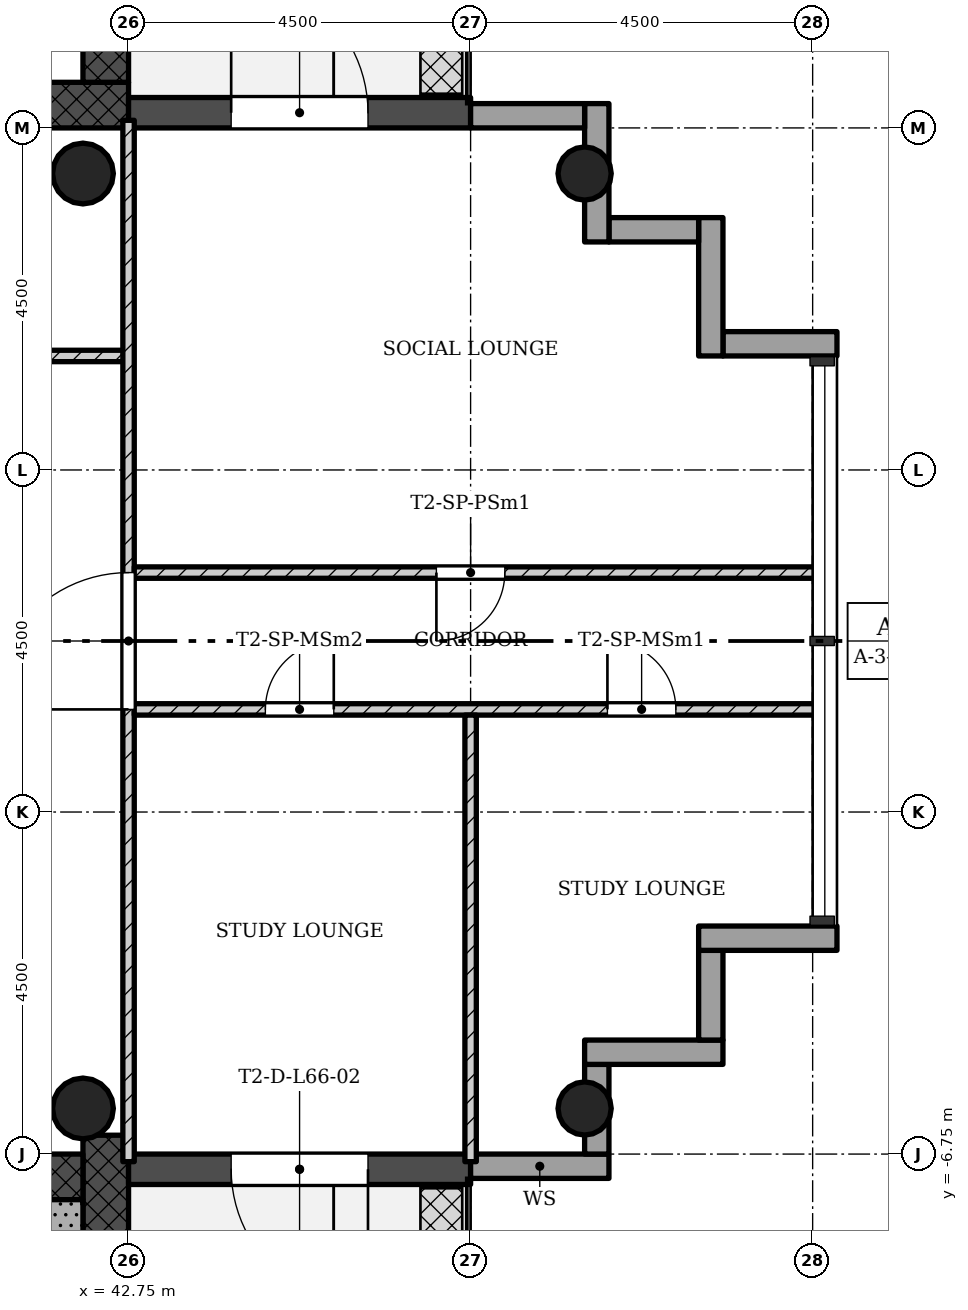
"""IFC4 building model, lengths in metres.
Left out: names, types, materials, properties, quantities, classifications, styles, units other than length and angle.
Written with IfcOpenShell. Run it as: python <this file> out.ifc"""

import sys

from ifc_helpers import new_model, si_unit, direction, frame, frame_2d, origin, origin_2d, place, context, subcontext, project, spatial, rectangle, hollow_circle, extrude, element, fill, save


model = new_model("IFC4")
c1 = context("Model", 3, precision=1e-05, world=origin(), true_north=direction((0.0, 1.0)))
c2 = subcontext(c1, "Body", "Model", "MODEL_VIEW")
j1 = project(units=[si_unit("LENGTHUNIT", "METRE"), si_unit("PLANEANGLEUNIT", "RADIAN")], contexts=[c1])
p1 = place(None, origin())
s1 = spatial("IfcSite", under=j1, at=p1, CompositionType="ELEMENT")
p2 = place(p1, origin())
s2 = spatial("IfcBuilding", under=s1, at=p2, CompositionType="ELEMENT")
p3 = place(p2, frame((0.0, 0.0, 237.9)))
s3 = spatial("IfcBuildingStorey", under=s2, at=p3, CompositionType="ELEMENT", Elevation=237.9)
p4 = place(p3, frame((29.85, 7.05, 0.0), z_axis=(0.0, 0.0, 1.0), x_axis=(1.0, 0.0, 0.0)))
e1 = element("IfcWall", 1, at=p4, inside=s3, PredefinedType="SHEAR", context=c2, shape_type="SweptSolid", body=[
    extrude(rectangle(XDim=12.9, YDim=0.6, at=frame_2d((6.45, 0.0))), origin(), (0.0, 0.0, 1.0), 4.5),
])
p5 = place(p4, frame((5.25, 0.0, 0.0)))
e2 = element("IfcOpeningElement", 2, at=p5, cuts=e1, PredefinedType="OPENING", context=c2, shape_type="SweptSolid", body=[
    extrude(rectangle(XDim=1.8, YDim=2.1, at=frame_2d((0.9, 1.05))), frame((0.0, 0.31, 0.0), z_axis=(0.0, -1.0, 0.0), x_axis=(1.0, 0.0, 0.0)), (0.0, 0.0, 1.0), 0.62),
])
p6 = place(p3, frame((42.45, 7.35, 0.0), z_axis=(0.0, 0.0, 1.0), x_axis=(0.0, 1.0, 0.0)))
e3 = element("IfcWall", 3, at=p6, inside=s3, PredefinedType="SHEAR", context=c2, shape_type="SweptSolid", body=[
    extrude(rectangle(XDim=8.4, YDim=0.6, at=frame_2d((4.2, 0.0))), origin(), (0.0, 0.0, 1.0), 4.5),
])
p7 = place(p3, frame((42.45, -15.15, 0.0), z_axis=(0.0, 0.0, 1.0), x_axis=(0.0, 1.0, 0.0)))
e4 = element("IfcWall", 4, at=p7, inside=s3, PredefinedType="SHEAR", context=c2, shape_type="SweptSolid", body=[
    extrude(rectangle(XDim=8.648, YDim=0.6, at=frame_2d((4.324, 0.0))), origin(), (0.0, 0.0, 1.0), 4.5),
])
p8 = place(p3, frame((42.15, -7.05, 0.0), z_axis=(0.0, 0.0, 1.0), x_axis=(-1.0, 0.0, 0.0)))
e5 = element("IfcWall", 5, at=p8, inside=s3, PredefinedType="SHEAR", context=c2, shape_type="SweptSolid", body=[
    extrude(rectangle(XDim=12.9, YDim=0.6, at=frame_2d((6.45, 0.0))), origin(), (0.0, 0.0, 1.0), 4.5),
])
p9 = place(p8, frame((5.25, 0.0, 0.0)))
e6 = element("IfcOpeningElement", 6, at=p9, cuts=e5, PredefinedType="OPENING", context=c2, shape_type="SweptSolid", body=[
    extrude(rectangle(XDim=1.8, YDim=2.1, at=frame_2d((0.9, 1.05))), frame((0.0, 0.31, 0.0), z_axis=(0.0, -1.0, 0.0), x_axis=(1.0, 0.0, 0.0)), (0.0, 0.0, 1.0), 0.62),
])
for number, where, z_axis, x_axis in (
    (7, (48.75, -6.15, 0.0), (0.0, 0.0, 1.0), (1.0, 0.0, 0.0)),
    (8, (48.75, 6.15, 0.0), (0.0, 0.0, 1.0), (1.0, 0.0, 0.0)),
):
    element("IfcColumn", number, at=place(p3, frame(where, z_axis=z_axis, x_axis=x_axis)), inside=s3, PredefinedType="COLUMN", context=c2, shape_type="SweptSolid", body=[
        extrude(hollow_circle(Radius=0.35, WallThickness=0.025, at=origin_2d()), origin(), (0.0, 0.0, 1.0), 4.5),
    ])
for number, where, z_axis, x_axis in (
    (9, (42.15, -6.15, 0.0), (0.0, 0.0, 1.0), (1.0, 0.0, 0.0)),
    (10, (42.15, 6.15, 0.0), (0.0, 0.0, 1.0), (1.0, 0.0, 0.0)),
):
    element("IfcColumn", number, at=place(p3, frame(where, z_axis=z_axis, x_axis=x_axis)), inside=s3, PredefinedType="COLUMN", context=c2, shape_type="SweptSolid", body=[
        extrude(hollow_circle(Radius=0.4, WallThickness=0.028, at=origin_2d()), origin(), (0.0, 0.0, 1.0), 4.5),
    ])
p10 = place(p3, frame((42.75, -6.95, -0.02), z_axis=(0.0, 0.0, 1.0), x_axis=(1.0, 0.0, 0.0)))
e11 = element("IfcWall", 11, at=p10, inside=s3, PredefinedType="STANDARD", context=c2, shape_type="SweptSolid", body=[
    extrude(rectangle(XDim=4.5, YDim=0.4, at=frame_2d((2.25, 0.0))), origin(), (0.0, 0.0, 1.0), 4.22),
])
p11 = place(p10, frame((1.35, 0.0, 0.02)))
e12 = element("IfcOpeningElement", 12, at=p11, cuts=e11, PredefinedType="OPENING", context=c2, shape_type="SweptSolid", body=[
    extrude(rectangle(XDim=1.8, YDim=2.1, at=frame_2d((0.9, 1.05))), frame((0.0, 0.21, 0.0), z_axis=(0.0, -1.0, 0.0), x_axis=(1.0, 0.0, 0.0)), (0.0, 0.0, 1.0), 0.42),
])
p12 = place(p3, frame((47.25, -6.91, -0.3), z_axis=(0.0, 0.0, 1.0), x_axis=(1.0, 0.0, 0.0)))
e13 = element("IfcWall", 13, at=p12, inside=s3, PredefinedType="STANDARD", context=c2, shape_type="SweptSolid", body=[
    extrude(rectangle(XDim=1.82, YDim=0.32, at=frame_2d((0.91, 0.0))), origin(), (0.0, 0.0, 1.0), 4.5),
])
p13 = place(p3, frame((48.91, -6.75, -0.3), z_axis=(0.0, 0.0, 1.0), x_axis=(0.0, 1.0, 0.0)))
e14 = element("IfcWall", 14, at=p13, inside=s3, PredefinedType="STANDARD", context=c2, shape_type="SweptSolid", body=[
    extrude(rectangle(XDim=1.18, YDim=0.32, at=frame_2d((0.59, 0.0))), origin(), (0.0, 0.0, 1.0), 4.5),
])
p14 = place(p3, frame((48.75, -5.41, -0.3), z_axis=(0.0, 0.0, 1.0), x_axis=(1.0, 0.0, 0.0)))
e15 = element("IfcWall", 15, at=p14, inside=s3, PredefinedType="STANDARD", context=c2, shape_type="SweptSolid", body=[
    extrude(rectangle(XDim=1.82, YDim=0.32, at=frame_2d((0.91, 0.0))), origin(), (0.0, 0.0, 1.0), 4.5),
])
p15 = place(p3, frame((50.41, -5.25, -0.3), z_axis=(0.0, 0.0, 1.0), x_axis=(0.0, 1.0, 0.0)))
e16 = element("IfcWall", 16, at=p15, inside=s3, PredefinedType="STANDARD", context=c2, shape_type="SweptSolid", body=[
    extrude(rectangle(XDim=1.18, YDim=0.32, at=frame_2d((0.59, 0.0))), origin(), (0.0, 0.0, 1.0), 4.5),
])
p16 = place(p3, frame((50.25, -3.91, -0.3), z_axis=(0.0, 0.0, 1.0), x_axis=(1.0, 0.0, 0.0)))
e17 = element("IfcWall", 17, at=p16, inside=s3, PredefinedType="STANDARD", context=c2, shape_type="SweptSolid", body=[
    extrude(rectangle(XDim=1.82, YDim=0.32, at=frame_2d((0.91, 0.0))), origin(), (0.0, 0.0, 1.0), 4.5),
])
p17 = place(p3, frame((52.07, 3.91, -0.3), z_axis=(0.0, 0.0, 1.0), x_axis=(-1.0, 0.0, 0.0)))
e18 = element("IfcWall", 18, at=p17, inside=s3, PredefinedType="STANDARD", context=c2, shape_type="SweptSolid", body=[
    extrude(rectangle(XDim=1.5, YDim=0.32, at=frame_2d((0.75, 0.0))), origin(), (0.0, 0.0, 1.0), 4.5),
])
p18 = place(p3, frame((50.41, 3.75, -0.3), z_axis=(0.0, 0.0, 1.0), x_axis=(0.0, 1.0, 0.0)))
e19 = element("IfcWall", 19, at=p18, inside=s3, PredefinedType="STANDARD", context=c2, shape_type="SweptSolid", body=[
    extrude(rectangle(XDim=1.82, YDim=0.32, at=frame_2d((0.91, 0.0))), origin(), (0.0, 0.0, 1.0), 4.5),
])
p19 = place(p3, frame((50.25, 5.41, -0.3), z_axis=(0.0, 0.0, 1.0), x_axis=(-1.0, 0.0, 0.0)))
e20 = element("IfcWall", 20, at=p19, inside=s3, PredefinedType="STANDARD", context=c2, shape_type="SweptSolid", body=[
    extrude(rectangle(XDim=1.18, YDim=0.32, at=frame_2d((0.59, 0.0))), origin(), (0.0, 0.0, 1.0), 4.5),
])
p20 = place(p3, frame((48.91, 5.25, -0.3), z_axis=(0.0, 0.0, 1.0), x_axis=(0.0, 1.0, 0.0)))
e21 = element("IfcWall", 21, at=p20, inside=s3, PredefinedType="STANDARD", context=c2, shape_type="SweptSolid", body=[
    extrude(rectangle(XDim=1.82, YDim=0.32, at=frame_2d((0.91, 0.0))), origin(), (0.0, 0.0, 1.0), 4.5),
])
p21 = place(p3, frame((48.75, 6.91, -0.3), z_axis=(0.0, 0.0, 1.0), x_axis=(-1.0, 0.0, 0.0)))
e22 = element("IfcWall", 22, at=p21, inside=s3, PredefinedType="STANDARD", context=c2, shape_type="SweptSolid", body=[
    extrude(rectangle(XDim=1.5, YDim=0.32, at=frame_2d((0.75, 0.0))), origin(), (0.0, 0.0, 1.0), 4.5),
])
p22 = place(p3, frame((47.25, 6.95, -0.02), z_axis=(0.0, 0.0, 1.0), x_axis=(-1.0, 0.0, 0.0)))
e23 = element("IfcWall", 23, at=p22, inside=s3, PredefinedType="STANDARD", context=c2, shape_type="SweptSolid", body=[
    extrude(rectangle(XDim=4.5, YDim=0.4, at=frame_2d((2.25, 0.0))), origin(), (0.0, 0.0, 1.0), 4.22),
])
p23 = place(p22, frame((1.35, 0.0, 0.02)))
e24 = element("IfcOpeningElement", 24, at=p23, cuts=e23, PredefinedType="OPENING", context=c2, shape_type="SweptSolid", body=[
    extrude(rectangle(XDim=1.8, YDim=2.1, at=frame_2d((0.9, 1.05))), frame((0.0, 0.21, 0.0), z_axis=(0.0, -1.0, 0.0), x_axis=(1.0, 0.0, 0.0)), (0.0, 0.0, 1.0), 0.42),
])
p24 = place(p3, frame((42.75, 3.75, 0.0), z_axis=(0.0, 0.0, 1.0), x_axis=(-1.0, 0.0, 0.0)))
e25 = element("IfcWall", 25, at=p24, inside=s3, PredefinedType="PARTITIONING", context=c2, shape_type="SweptSolid", body=[
    extrude(rectangle(XDim=4.5, YDim=0.15, at=frame_2d((2.25, 0.0))), origin(), (0.0, 0.0, 1.0), 4.1),
])
p25 = place(p24, frame((1.8, 0.0, 0.0)))
e26 = element("IfcOpeningElement", 26, at=p25, cuts=e25, PredefinedType="OPENING", context=c2, shape_type="SweptSolid", body=[
    extrude(rectangle(XDim=0.9, YDim=2.1, at=frame_2d((0.45, 1.05))), frame((0.0, 0.085, 0.0), z_axis=(0.0, -1.0, 0.0), x_axis=(1.0, 0.0, 0.0)), (0.0, 0.0, 1.0), 0.17),
])
p26 = place(p3, frame((42.75, -6.85, 0.0), z_axis=(0.0, 0.0, 1.0), x_axis=(0.0, 1.0, 0.0)))
e27 = element("IfcWall", 27, at=p26, inside=s3, PredefinedType="PARTITIONING", context=c2, shape_type="SweptSolid", body=[
    extrude(rectangle(XDim=13.7, YDim=0.15, at=frame_2d((6.85, 0.0))), origin(), (0.0, 0.0, 1.0), 4.1),
])
p27 = place(p26, frame((5.95, 0.0, 0.0)))
e28 = element("IfcOpeningElement", 28, at=p27, cuts=e27, PredefinedType="OPENING", context=c2, shape_type="SweptSolid", body=[
    extrude(rectangle(XDim=1.8, YDim=2.1, at=frame_2d((0.9, 1.05))), frame((0.0, 0.085, 0.0), z_axis=(0.0, -1.0, 0.0), x_axis=(1.0, 0.0, 0.0)), (0.0, 0.0, 1.0), 0.17),
])
p28 = place(p3, frame((51.85, 0.9, 0.0), z_axis=(0.0, 0.0, 1.0), x_axis=(-1.0, 0.0, 0.0)))
e29 = element("IfcWall", 29, at=p28, inside=s3, PredefinedType="PARTITIONING", context=c2, shape_type="SweptSolid", body=[
    extrude(rectangle(XDim=9.025, YDim=0.15, at=frame_2d((4.513, 0.0))), origin(), (0.0, 0.0, 1.0), 4.1),
])
p29 = place(p28, frame((4.15, 0.0, 0.0)))
e30 = element("IfcOpeningElement", 30, at=p29, cuts=e29, PredefinedType="OPENING", context=c2, shape_type="SweptSolid", body=[
    extrude(rectangle(XDim=0.9, YDim=2.1, at=frame_2d((0.45, 1.05))), frame((0.0, 0.085, 0.0), z_axis=(0.0, -1.0, 0.0), x_axis=(1.0, 0.0, 0.0)), (0.0, 0.0, 1.0), 0.17),
])
p30 = place(p3, frame((51.85, -0.9, 0.0), z_axis=(0.0, 0.0, 1.0), x_axis=(-1.0, 0.0, 0.0)))
e31 = element("IfcWall", 31, at=p30, inside=s3, PredefinedType="PARTITIONING", context=c2, shape_type="SweptSolid", body=[
    extrude(rectangle(XDim=9.025, YDim=0.15, at=frame_2d((4.513, 0.0))), origin(), (0.0, 0.0, 1.0), 4.1),
])
p31 = place(p30, frame((1.9, 0.0, 0.0)))
e32 = element("IfcOpeningElement", 32, at=p31, cuts=e31, PredefinedType="OPENING", context=c2, shape_type="SweptSolid", body=[
    extrude(rectangle(XDim=0.9, YDim=2.1, at=frame_2d((0.45, 1.05))), frame((0.0, 0.085, 0.0), z_axis=(0.0, -1.0, 0.0), x_axis=(1.0, 0.0, 0.0)), (0.0, 0.0, 1.0), 0.17),
])
p32 = place(p30, frame((6.4, 0.0, 0.0)))
e33 = element("IfcOpeningElement", 33, at=p32, cuts=e31, PredefinedType="OPENING", context=c2, shape_type="SweptSolid", body=[
    extrude(rectangle(XDim=0.9, YDim=2.1, at=frame_2d((0.45, 1.05))), frame((0.0, 0.085, 0.0), z_axis=(0.0, -1.0, 0.0), x_axis=(1.0, 0.0, 0.0)), (0.0, 0.0, 1.0), 0.17),
])
p33 = place(p3, frame((47.25, -0.975, 0.0), z_axis=(0.0, 0.0, 1.0), x_axis=(0.0, -1.0, 0.0)))
e34 = element("IfcWall", 34, at=p33, inside=s3, PredefinedType="PARTITIONING", context=c2, shape_type="SweptSolid", body=[
    extrude(rectangle(XDim=5.875, YDim=0.15, at=frame_2d((2.938, 0.0))), origin(), (0.0, 0.0, 1.0), 4.1),
])
p34 = place(p3, frame((37.85, -7.65, 0.0), z_axis=(0.0, 0.0, 1.0), x_axis=(1.0, 0.0, 0.0)))
e35 = element("IfcWall", 35, at=p34, inside=s3, PredefinedType="SHEAR", context=c2, shape_type="SweptSolid", body=[
    extrude(rectangle(XDim=4.3, YDim=0.6, at=frame_2d((2.15, 0.0))), origin(), (0.0, 0.0, 1.0), 4.5),
])
p35 = place(p11, origin())
e36 = element("IfcDoor", 36, at=p35, inside=s3, OperationType="SINGLE_SWING_RIGHT", PredefinedType="DOOR", context=c2, shape_type="SweptSolid", body=[
    extrude(rectangle(XDim=1.8, YDim=2.1, at=frame_2d((0.9, 1.05))), frame((0.0, 0.025, 0.0), z_axis=(0.0, -1.0, 0.0), x_axis=(1.0, 0.0, 0.0)), (0.0, 0.0, 1.0), 0.05),
])
fill(e12, e36)
p36 = place(p23, origin())
e37 = element("IfcDoor", 37, at=p36, inside=s3, OperationType="SINGLE_SWING_RIGHT", PredefinedType="DOOR", context=c2, shape_type="SweptSolid", body=[
    extrude(rectangle(XDim=1.8, YDim=2.1, at=frame_2d((0.9, 1.05))), frame((0.0, 0.025, 0.0), z_axis=(0.0, -1.0, 0.0), x_axis=(1.0, 0.0, 0.0)), (0.0, 0.0, 1.0), 0.05),
])
fill(e24, e37)
p37 = place(p27, origin())
e38 = element("IfcDoor", 38, at=p37, inside=s3, OperationType="SINGLE_SWING_RIGHT", PredefinedType="DOOR", context=c2, shape_type="SweptSolid", body=[
    extrude(rectangle(XDim=1.8, YDim=2.1, at=frame_2d((0.9, 1.05))), frame((0.0, 0.025, 0.0), z_axis=(0.0, -1.0, 0.0), x_axis=(1.0, 0.0, 0.0)), (0.0, 0.0, 1.0), 0.05),
])
fill(e28, e38)
p38 = place(p29, origin())
e39 = element("IfcDoor", 39, at=p38, inside=s3, OperationType="SINGLE_SWING_LEFT", PredefinedType="DOOR", context=c2, shape_type="SweptSolid", body=[
    extrude(rectangle(XDim=0.9, YDim=2.1, at=frame_2d((0.45, 1.05))), frame((0.0, 0.025, 0.0), z_axis=(0.0, -1.0, 0.0), x_axis=(1.0, 0.0, 0.0)), (0.0, 0.0, 1.0), 0.05),
])
fill(e30, e39)
p39 = place(p31, origin())
e40 = element("IfcDoor", 40, at=p39, inside=s3, OperationType="SINGLE_SWING_RIGHT", PredefinedType="DOOR", context=c2, shape_type="SweptSolid", body=[
    extrude(rectangle(XDim=0.9, YDim=2.1, at=frame_2d((0.45, 1.05))), frame((0.0, 0.025, 0.0), z_axis=(0.0, -1.0, 0.0), x_axis=(1.0, 0.0, 0.0)), (0.0, 0.0, 1.0), 0.05),
])
fill(e32, e40)
p40 = place(p32, origin())
e41 = element("IfcDoor", 41, at=p40, inside=s3, OperationType="SINGLE_SWING_LEFT", PredefinedType="DOOR", context=c2, shape_type="SweptSolid", body=[
    extrude(rectangle(XDim=0.9, YDim=2.1, at=frame_2d((0.45, 1.05))), frame((0.0, 0.025, 0.0), z_axis=(0.0, -1.0, 0.0), x_axis=(1.0, 0.0, 0.0)), (0.0, 0.0, 1.0), 0.05),
])
fill(e33, e41)
save(model, sys.argv[1])
